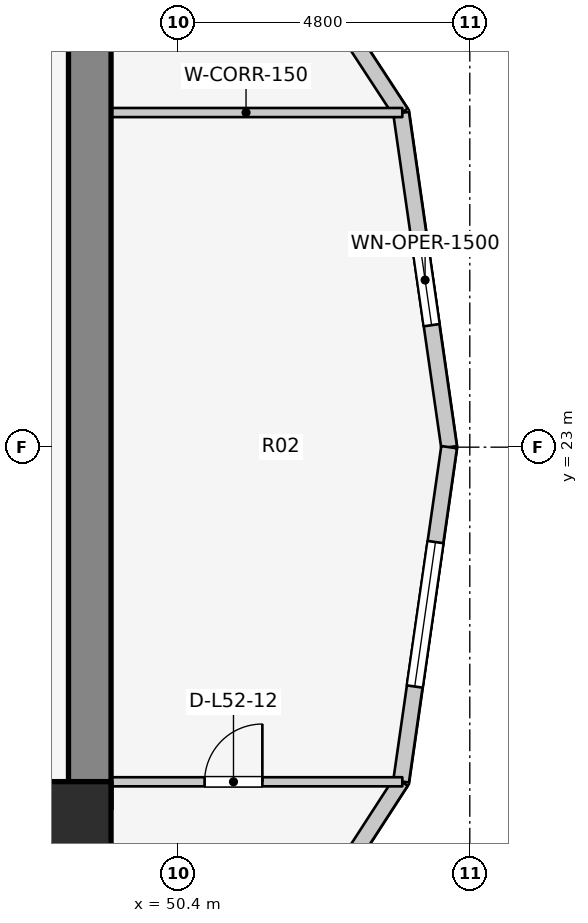
"""IFC4 building model, lengths in metres.
Left out: names, types, materials, properties, quantities, classifications, styles, units other than length and angle.
Written with IfcOpenShell. Run it as: python <this file> out.ifc"""

import sys

from ifc_helpers import new_model, si_unit, direction, frame, frame_2d, origin, origin_2d, place, context, subcontext, project, spatial, rectangle, extrude, element, fill, save


model = new_model("IFC4")
c1 = context("Model", 3, precision=1e-05, world=origin(), true_north=direction((0.0, 1.0)))
c2 = subcontext(c1, "Body", "Model", "MODEL_VIEW")
j1 = project(units=[si_unit("LENGTHUNIT", "METRE"), si_unit("PLANEANGLEUNIT", "RADIAN")], contexts=[c1])
p1 = place(None, origin())
s1 = spatial("IfcSite", under=j1, at=p1, CompositionType="ELEMENT")
p2 = place(p1, origin())
s2 = spatial("IfcBuilding", under=s1, at=p2, CompositionType="ELEMENT")
p3 = place(p2, frame((0.0, 0.0, 171.5)))
s3 = spatial("IfcBuildingStorey", under=s2, at=p3, CompositionType="ELEMENT", Elevation=171.5)
p4 = place(p3, frame((48.95, 17.05, 0.0), z_axis=(0.0, 0.0, 1.0), x_axis=(0.0, 1.0, 0.0)))
e1 = element("IfcWall", 1, at=p4, inside=s3, PredefinedType="SHEAR", context=c2, shape_type="SweptSolid", body=[
    extrude(rectangle(XDim=12.8, YDim=0.7, at=frame_2d((6.4, 0.0))), origin(), (0.0, 0.0, 1.0), 3.1),
])
p5 = place(p3, frame((48.7, 16.9, 0.0), z_axis=(0.0, 0.0, 1.0), x_axis=(1.0, 0.0, 0.0)))
e2 = element("IfcColumn", 2, at=p5, inside=s3, PredefinedType="COLUMN", context=c2, shape_type="SweptSolid", body=[
    extrude(rectangle(XDim=1.2, YDim=1.2, at=origin_2d()), origin(), (0.0, 0.0, 1.0), 3.1),
])
p6 = place(p3, frame((54.86, 23.0, 0.0), z_axis=(0.0, 0.0, 1.0), x_axis=(-0.142227632286, 0.989833976288, 0.0)))
e3 = element("IfcWall", 3, at=p6, inside=s3, PredefinedType="STANDARD", context=c2, shape_type="SweptSolid", body=[
    extrude(rectangle(XDim=5.553, YDim=0.26, at=frame_2d((2.776, 0.0))), origin(), (0.0, 0.0, 1.0), 2.85),
])
p7 = place(p6, frame((2.027, 0.0, 0.75)))
e4 = element("IfcOpeningElement", 4, at=p7, cuts=e3, PredefinedType="OPENING", context=c2, shape_type="SweptSolid", body=[
    extrude(rectangle(XDim=1.5, YDim=1.6, at=frame_2d((0.75, 0.8))), frame((0.0, 0.14, 0.0), z_axis=(0.0, -1.0, 0.0), x_axis=(1.0, 0.0, 0.0)), (0.0, 0.0, 1.0), 0.28),
])
p8 = place(p3, frame((54.07, 28.497, 0.0), z_axis=(0.0, 0.0, 1.0), x_axis=(-0.547456494366, 0.836834145322, 0.0)))
e5 = element("IfcWall", 5, at=p8, inside=s3, PredefinedType="STANDARD", context=c2, shape_type="SweptSolid", body=[
    extrude(rectangle(XDim=4.477, YDim=0.26, at=frame_2d((2.239, 0.0))), origin(), (0.0, 0.0, 1.0), 2.85),
])
p9 = place(p8, frame((1.489, 0.0, 0.75)))
e6 = element("IfcOpeningElement", 6, at=p9, cuts=e5, PredefinedType="OPENING", context=c2, shape_type="SweptSolid", body=[
    extrude(rectangle(XDim=1.5, YDim=1.6, at=frame_2d((0.75, 0.8))), frame((0.0, 0.14, 0.0), z_axis=(0.0, -1.0, 0.0), x_axis=(1.0, 0.0, 0.0)), (0.0, 0.0, 1.0), 0.28),
])
p10 = place(p3, frame((51.619, 13.716, 0.0), z_axis=(0.0, 0.0, 1.0), x_axis=(0.543358984534, 0.839500454989, 0.0)))
e7 = element("IfcWall", 7, at=p10, inside=s3, PredefinedType="STANDARD", context=c2, shape_type="SweptSolid", body=[
    extrude(rectangle(XDim=4.511, YDim=0.26, at=frame_2d((2.256, 0.0))), origin(), (0.0, 0.0, 1.0), 2.85),
])
p11 = place(p10, frame((1.506, 0.0, 0.75)))
e8 = element("IfcOpeningElement", 8, at=p11, cuts=e7, PredefinedType="OPENING", context=c2, shape_type="SweptSolid", body=[
    extrude(rectangle(XDim=1.5, YDim=1.6, at=frame_2d((0.75, 0.8))), frame((0.0, 0.14, 0.0), z_axis=(0.0, -1.0, 0.0), x_axis=(1.0, 0.0, 0.0)), (0.0, 0.0, 1.0), 0.28),
])
p12 = place(p3, frame((54.07, 17.503, 0.0), z_axis=(0.0, 0.0, 1.0), x_axis=(0.142227632286, 0.989833976288, 0.0)))
e9 = element("IfcWall", 9, at=p12, inside=s3, PredefinedType="STANDARD", context=c2, shape_type="SweptSolid", body=[
    extrude(rectangle(XDim=5.553, YDim=0.26, at=frame_2d((2.776, 0.0))), origin(), (0.0, 0.0, 1.0), 2.85),
])
p13 = place(p12, frame((1.576, 0.0, 0.75)))
e10 = element("IfcOpeningElement", 10, at=p13, cuts=e9, PredefinedType="OPENING", context=c2, shape_type="SweptSolid", body=[
    extrude(rectangle(XDim=2.4, YDim=1.7, at=frame_2d((1.2, 0.85))), frame((0.0, 0.14, 0.0), z_axis=(0.0, -1.0, 0.0), x_axis=(1.0, 0.0, 0.0)), (0.0, 0.0, 1.0), 0.28),
])
p14 = place(p3, frame((48.95, 17.497, 0.0), z_axis=(0.0, 0.0, 1.0), x_axis=(1.0, 0.0, 0.0)))
e11 = element("IfcWall", 11, at=p14, inside=s3, PredefinedType="PARTITIONING", context=c2, shape_type="SweptSolid", body=[
    extrude(rectangle(XDim=5.14, YDim=0.15, at=frame_2d((2.57, 0.0))), origin(), (0.0, 0.0, 1.0), 2.855),
])
p15 = place(p14, frame((1.889, 0.0, 0.0)))
e12 = element("IfcOpeningElement", 12, at=p15, cuts=e11, PredefinedType="OPENING", context=c2, shape_type="SweptSolid", body=[
    extrude(rectangle(XDim=0.95, YDim=2.1, at=frame_2d((0.475, 1.05))), frame((0.0, 0.085, 0.0), z_axis=(0.0, -1.0, 0.0), x_axis=(1.0, 0.0, 0.0)), (0.0, 0.0, 1.0), 0.17),
])
p16 = place(p3, frame((48.95, 28.503, 0.0), z_axis=(0.0, 0.0, 1.0), x_axis=(1.0, 0.0, 0.0)))
e13 = element("IfcWall", 13, at=p16, inside=s3, PredefinedType="PARTITIONING", context=c2, shape_type="SweptSolid", body=[
    extrude(rectangle(XDim=5.14, YDim=0.15, at=frame_2d((2.57, 0.0))), origin(), (0.0, 0.0, 1.0), 2.855),
])
p17 = place(p7, origin())
e14 = element("IfcWindow", 14, at=p17, inside=s3, PartitioningType="SINGLE_PANEL", PredefinedType="WINDOW", context=c2, shape_type="SweptSolid", body=[
    extrude(rectangle(XDim=1.5, YDim=1.6, at=frame_2d((0.75, 0.8))), frame((0.0, 0.03, 0.0), z_axis=(0.0, -1.0, 0.0), x_axis=(1.0, 0.0, 0.0)), (0.0, 0.0, 1.0), 0.06),
])
fill(e4, e14)
p18 = place(p13, origin())
e15 = element("IfcWindow", 15, at=p18, inside=s3, PartitioningType="SINGLE_PANEL", PredefinedType="WINDOW", context=c2, shape_type="SweptSolid", body=[
    extrude(rectangle(XDim=2.4, YDim=1.7, at=frame_2d((1.2, 0.85))), frame((0.0, 0.03, 0.0), z_axis=(0.0, -1.0, 0.0), x_axis=(1.0, 0.0, 0.0)), (0.0, 0.0, 1.0), 0.06),
])
fill(e10, e15)
p19 = place(p15, origin())
e16 = element("IfcDoor", 16, at=p19, inside=s3, OperationType="SINGLE_SWING_RIGHT", PredefinedType="DOOR", context=c2, shape_type="SweptSolid", body=[
    extrude(rectangle(XDim=0.95, YDim=2.1, at=frame_2d((0.475, 1.05))), frame((0.0, 0.025, 0.0), z_axis=(0.0, -1.0, 0.0), x_axis=(1.0, 0.0, 0.0)), (0.0, 0.0, 1.0), 0.05),
])
fill(e12, e16)
save(model, sys.argv[1])
